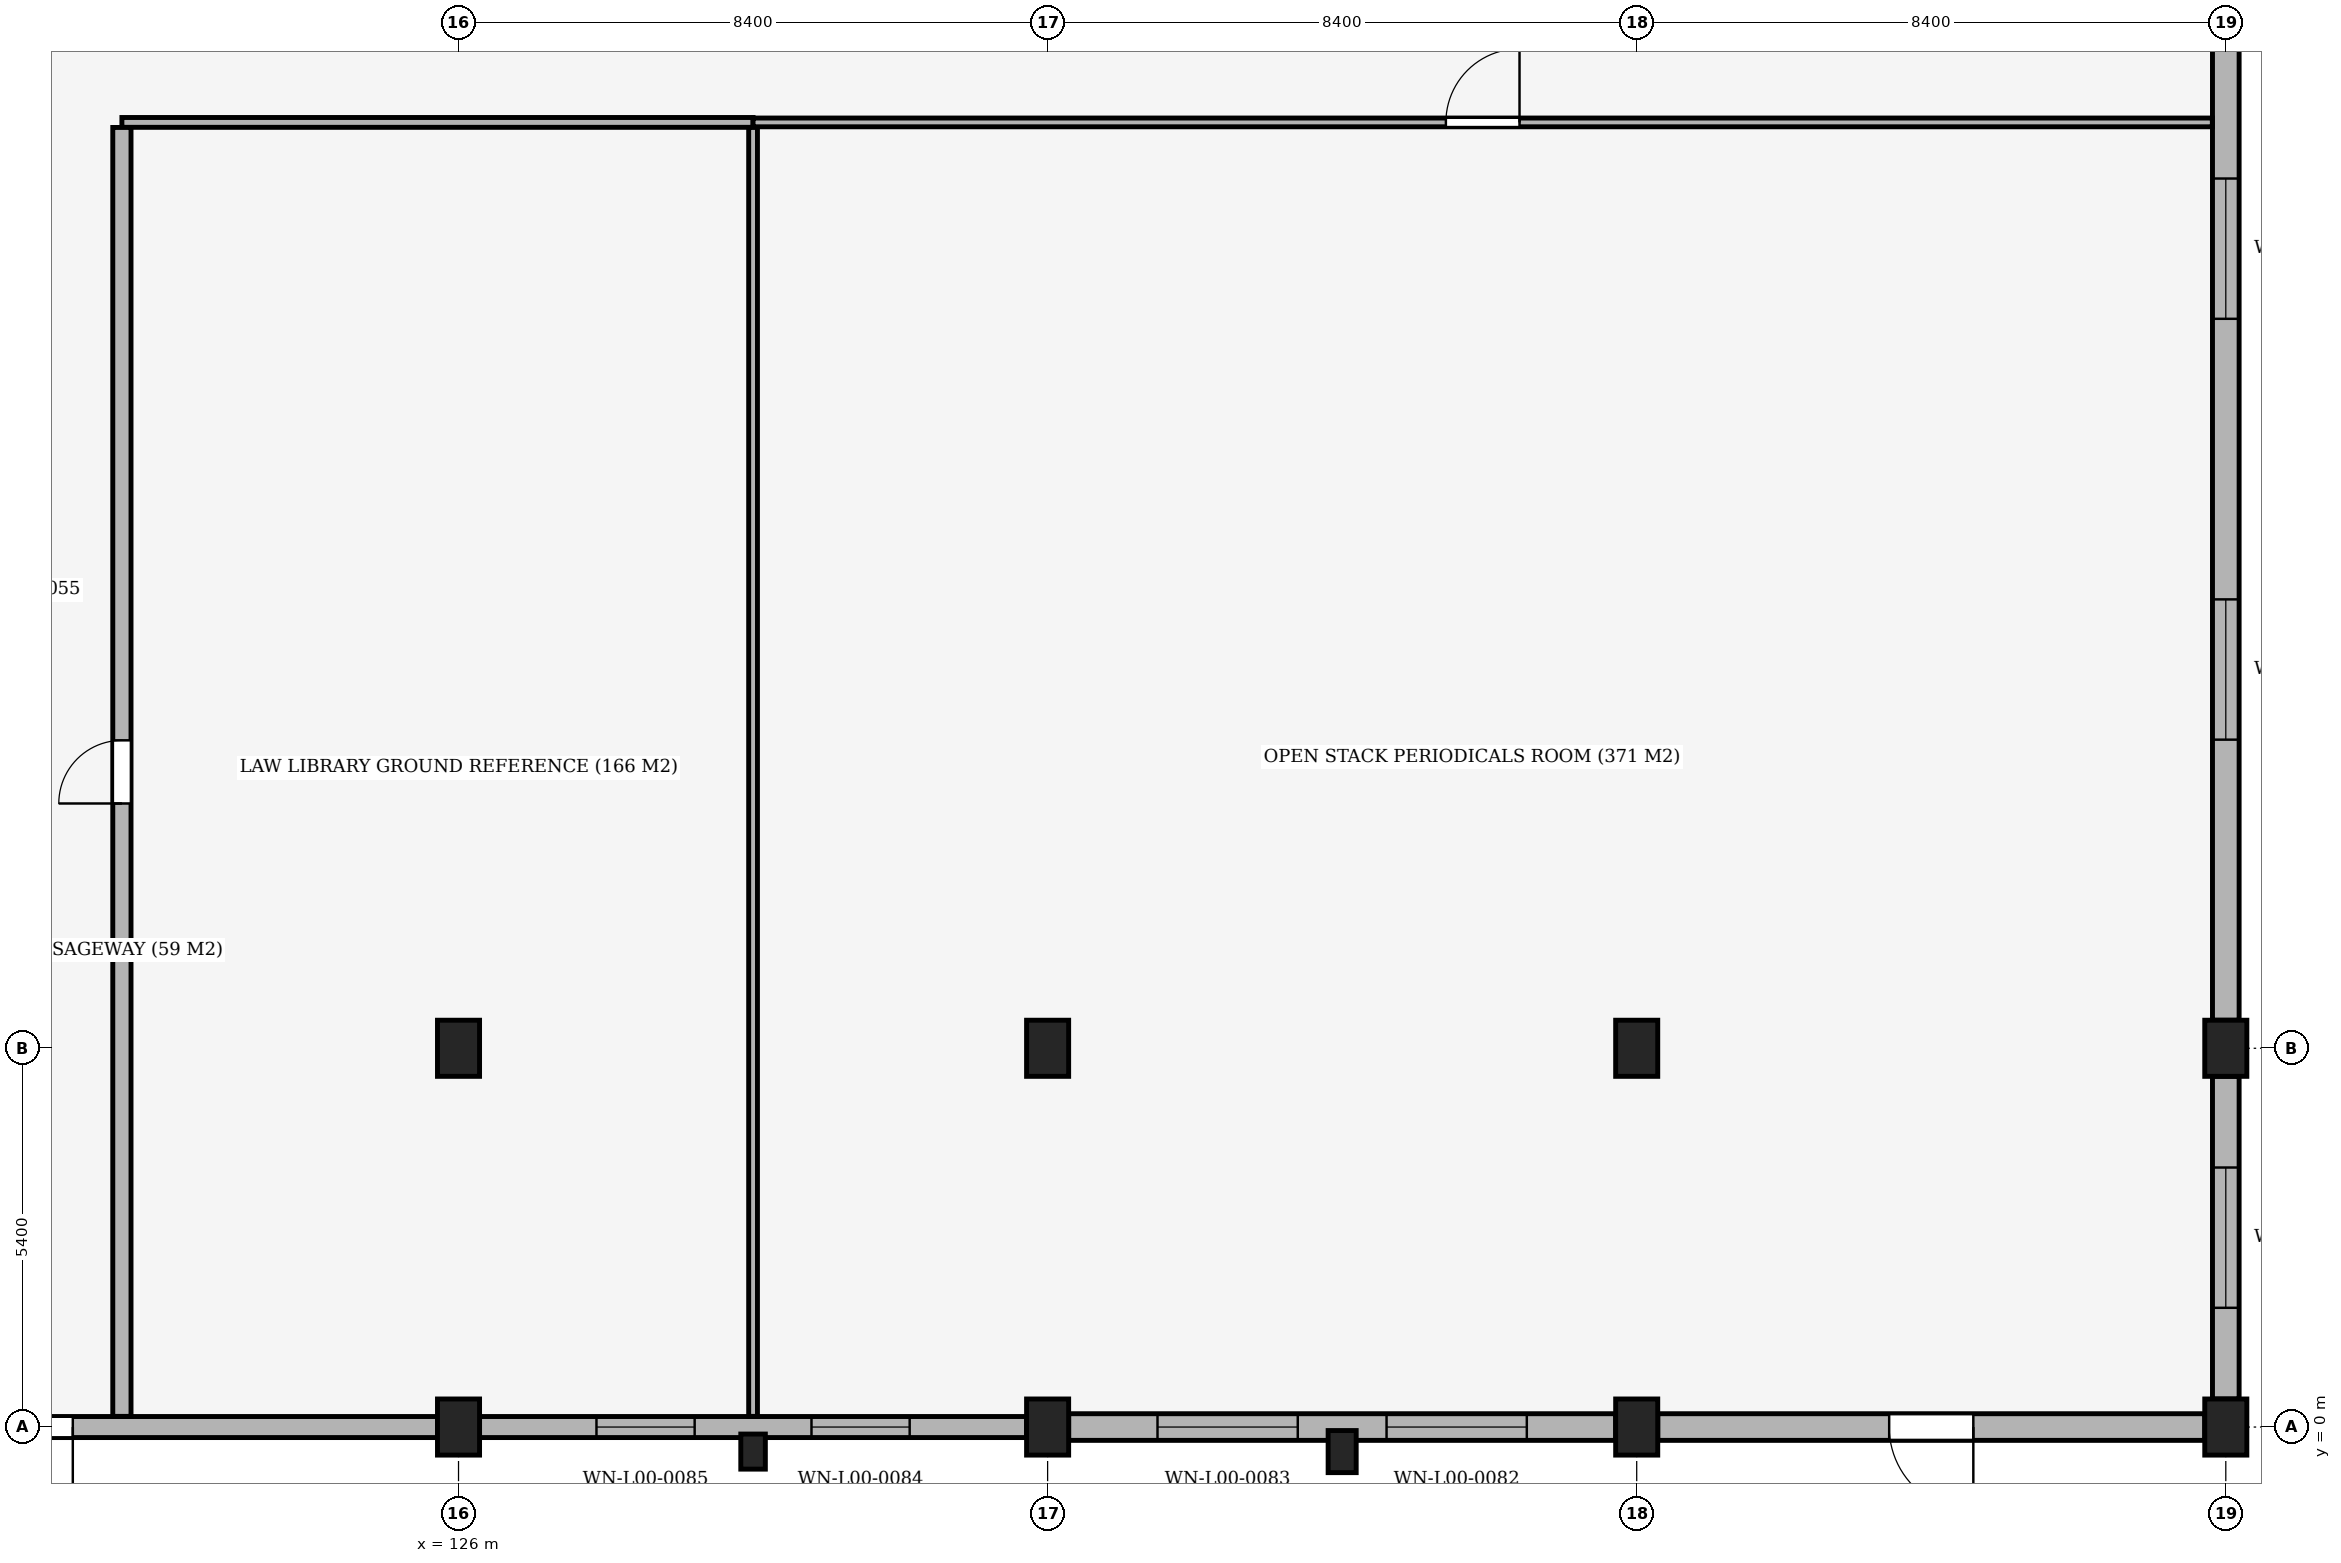
"""IFC4 building model, lengths in metres.
Left out: names, types, materials, properties, quantities, classifications, styles, units other than length and angle.
Written with IfcOpenShell. Run it as: python <this file> out.ifc"""

import sys

from ifc_helpers import new_model, si_unit, direction, frame, frame_2d, origin, origin_2d, place, context, subcontext, project, spatial, rectangle, extrude, element, fill, save


model = new_model("IFC4")
c1 = context("Model", 3, precision=1e-05, world=origin(), true_north=direction((0.0, 1.0)))
c2 = subcontext(c1, "Body", "Model", "MODEL_VIEW")
j1 = project(units=[si_unit("LENGTHUNIT", "METRE"), si_unit("PLANEANGLEUNIT", "RADIAN")], contexts=[c1])
p1 = place(None, origin())
s1 = spatial("IfcSite", under=j1, at=p1, CompositionType="ELEMENT")
p2 = place(p1, origin())
s2 = spatial("IfcBuilding", under=s1, at=p2, CompositionType="ELEMENT")
p3 = place(p2, origin())
s3 = spatial("IfcBuildingStorey", under=s2, at=p3, CompositionType="ELEMENT", Elevation=0.0)
for number, where, z_axis, x_axis in (
    (1, (126.0, 0.0, 0.0), (0.0, 0.0, 1.0), (1.0, 0.0, 0.0)),
    (2, (126.0, 5.4, 0.0), (0.0, 0.0, 1.0), (1.0, 0.0, 0.0)),
    (3, (134.4, 0.0, 0.0), (0.0, 0.0, 1.0), (1.0, 0.0, 0.0)),
    (4, (134.4, 5.4, 0.0), (0.0, 0.0, 1.0), (1.0, 0.0, 0.0)),
    (5, (142.8, 0.0, 0.0), (0.0, 0.0, 1.0), (1.0, 0.0, 0.0)),
    (6, (142.8, 5.4, 0.0), (0.0, 0.0, 1.0), (1.0, 0.0, 0.0)),
    (7, (151.2, 0.0, 0.0), (0.0, 0.0, 1.0), (1.0, 0.0, 0.0)),
    (8, (151.2, 5.4, 0.0), (0.0, 0.0, 1.0), (1.0, 0.0, 0.0)),
):
    element("IfcColumn", number, at=place(p3, frame(where, z_axis=z_axis, x_axis=x_axis)), inside=s3, PredefinedType="COLUMN", context=c2, shape_type="SweptSolid", body=[
        extrude(rectangle(XDim=0.6, YDim=0.8, at=origin_2d()), origin(), (0.0, 0.0, 1.0), 5.1),
    ])
p4 = place(p3, frame((130.2, -0.35, 0.0), z_axis=(0.0, 0.0, 1.0), x_axis=(1.0, 0.0, 0.0)))
e9 = element("IfcColumn", 9, at=p4, inside=s3, PredefinedType="PILASTER", context=c2, shape_type="SweptSolid", body=[
    extrude(rectangle(XDim=0.35, YDim=0.5, at=origin_2d()), origin(), (0.0, 0.0, 1.0), 5.1),
])
p5 = place(p3, frame((138.6, -0.35, 0.0), z_axis=(0.0, 0.0, 1.0), x_axis=(1.0, 0.0, 0.0)))
e10 = element("IfcColumn", 10, at=p5, inside=s3, PredefinedType="PILASTER", context=c2, shape_type="SweptSolid", body=[
    extrude(rectangle(XDim=0.4, YDim=0.6, at=origin_2d()), origin(), (0.0, 0.0, 1.0), 5.1),
])
p6 = place(p3, frame((151.2, 21.8, 0.0), z_axis=(0.0, 0.0, 1.0), x_axis=(0.0, -1.0, 0.0)))
e11 = element("IfcWall", 11, at=p6, inside=s3, PredefinedType="SOLIDWALL", context=c2, shape_type="SweptSolid", body=[
    extrude(rectangle(XDim=16.0, YDim=0.38, at=frame_2d((8.0, 0.0))), origin(), (0.0, 0.0, 1.0), 3.67),
])
p7 = place(p6, frame((4.0, 0.0, 2.1)))
e12 = element("IfcOpeningElement", 12, at=p7, cuts=e11, PredefinedType="OPENING", context=c2, shape_type="SweptSolid", body=[
    extrude(rectangle(XDim=2.0, YDim=1.2, at=frame_2d((1.0, 0.6))), frame((0.0, 0.205, 0.0), z_axis=(0.0, -1.0, 0.0), x_axis=(1.0, 0.0, 0.0)), (0.0, 0.0, 1.0), 0.41),
])
p8 = place(p6, frame((10.0, 0.0, 2.1)))
e13 = element("IfcOpeningElement", 13, at=p8, cuts=e11, PredefinedType="OPENING", context=c2, shape_type="SweptSolid", body=[
    extrude(rectangle(XDim=2.0, YDim=1.2, at=frame_2d((1.0, 0.6))), frame((0.0, 0.205, 0.0), z_axis=(0.0, -1.0, 0.0), x_axis=(1.0, 0.0, 0.0)), (0.0, 0.0, 1.0), 0.41),
])
p9 = place(p3, frame((151.2, 5.0, 0.0), z_axis=(0.0, 0.0, 1.0), x_axis=(0.0, -1.0, 0.0)))
e14 = element("IfcWall", 14, at=p9, inside=s3, PredefinedType="SOLIDWALL", context=c2, shape_type="SweptSolid", body=[
    extrude(rectangle(XDim=4.6, YDim=0.38, at=frame_2d((2.3, 0.0))), origin(), (0.0, 0.0, 1.0), 4.17),
])
p10 = place(p9, frame((1.3, 0.0, 2.1)))
e15 = element("IfcOpeningElement", 15, at=p10, cuts=e14, PredefinedType="OPENING", context=c2, shape_type="SweptSolid", body=[
    extrude(rectangle(XDim=2.0, YDim=1.2, at=frame_2d((1.0, 0.6))), frame((0.0, 0.205, 0.0), z_axis=(0.0, -1.0, 0.0), x_axis=(1.0, 0.0, 0.0)), (0.0, 0.0, 1.0), 0.41),
])
p11 = place(p3, frame((150.9, 0.0, 0.0), z_axis=(0.0, 0.0, 1.0), x_axis=(-1.0, 0.0, 0.0)))
e16 = element("IfcWall", 16, at=p11, inside=s3, PredefinedType="SOLIDWALL", context=c2, shape_type="SweptSolid", body=[
    extrude(rectangle(XDim=7.8, YDim=0.38, at=frame_2d((3.9, 0.0))), origin(), (0.0, 0.0, 1.0), 4.07),
])
p12 = place(p11, frame((3.3, 0.0, 0.0)))
e17 = element("IfcOpeningElement", 17, at=p12, cuts=e16, PredefinedType="OPENING", context=c2, shape_type="SweptSolid", body=[
    extrude(rectangle(XDim=1.2, YDim=2.2, at=frame_2d((0.6, 1.1))), frame((0.0, 0.205, 0.0), z_axis=(0.0, -1.0, 0.0), x_axis=(1.0, 0.0, 0.0)), (0.0, 0.0, 1.0), 0.41),
])
p13 = place(p3, frame((142.5, 0.0, 0.0), z_axis=(0.0, 0.0, 1.0), x_axis=(-1.0, 0.0, 0.0)))
e18 = element("IfcWall", 18, at=p13, inside=s3, PredefinedType="SOLIDWALL", context=c2, shape_type="SweptSolid", body=[
    extrude(rectangle(XDim=7.8, YDim=0.38, at=frame_2d((3.9, 0.0))), origin(), (0.0, 0.0, 1.0), 4.07),
])
p14 = place(p13, frame((1.267, 0.0, 2.1)))
e19 = element("IfcOpeningElement", 19, at=p14, cuts=e18, PredefinedType="OPENING", context=c2, shape_type="SweptSolid", body=[
    extrude(rectangle(XDim=2.0, YDim=1.2, at=frame_2d((1.0, 0.6))), frame((0.0, 0.205, 0.0), z_axis=(0.0, -1.0, 0.0), x_axis=(1.0, 0.0, 0.0)), (0.0, 0.0, 1.0), 0.41),
])
p15 = place(p13, frame((4.533, 0.0, 2.1)))
e20 = element("IfcOpeningElement", 20, at=p15, cuts=e18, PredefinedType="OPENING", context=c2, shape_type="SweptSolid", body=[
    extrude(rectangle(XDim=2.0, YDim=1.2, at=frame_2d((1.0, 0.6))), frame((0.0, 0.205, 0.0), z_axis=(0.0, -1.0, 0.0), x_axis=(1.0, 0.0, 0.0)), (0.0, 0.0, 1.0), 0.41),
])
p16 = place(p3, frame((134.1, 0.0, 0.0), z_axis=(0.0, 0.0, 1.0), x_axis=(-1.0, 0.0, 0.0)))
e21 = element("IfcWall", 21, at=p16, inside=s3, PredefinedType="SOLIDWALL", context=c2, shape_type="SweptSolid", body=[
    extrude(rectangle(XDim=7.8, YDim=0.3, at=frame_2d((3.9, 0.0))), origin(), (0.0, 0.0, 1.0), 4.07),
])
p17 = place(p16, frame((1.667, 0.0, 0.85)))
e22 = element("IfcOpeningElement", 22, at=p17, cuts=e21, PredefinedType="OPENING", context=c2, shape_type="SweptSolid", body=[
    extrude(rectangle(XDim=1.4, YDim=2.4, at=frame_2d((0.7, 1.2))), frame((0.0, 0.165, 0.0), z_axis=(0.0, -1.0, 0.0), x_axis=(1.0, 0.0, 0.0)), (0.0, 0.0, 1.0), 0.33),
])
p18 = place(p16, frame((4.733, 0.0, 0.85)))
e23 = element("IfcOpeningElement", 23, at=p18, cuts=e21, PredefinedType="OPENING", context=c2, shape_type="SweptSolid", body=[
    extrude(rectangle(XDim=1.4, YDim=2.4, at=frame_2d((0.7, 1.2))), frame((0.0, 0.165, 0.0), z_axis=(0.0, -1.0, 0.0), x_axis=(1.0, 0.0, 0.0)), (0.0, 0.0, 1.0), 0.33),
])
p19 = place(p3, frame((125.7, 0.0, 0.0), z_axis=(0.0, 0.0, 1.0), x_axis=(-1.0, 0.0, 0.0)))
e24 = element("IfcWall", 24, at=p19, inside=s3, PredefinedType="SOLIDWALL", context=c2, shape_type="SweptSolid", body=[
    extrude(rectangle(XDim=7.8, YDim=0.3, at=frame_2d((3.9, 0.0))), origin(), (0.0, 0.0, 1.0), 4.07),
])
p20 = place(p19, frame((5.2, 0.0, 0.0)))
e25 = element("IfcOpeningElement", 25, at=p20, cuts=e24, PredefinedType="OPENING", context=c2, shape_type="SweptSolid", body=[
    extrude(rectangle(XDim=1.8, YDim=2.2, at=frame_2d((0.9, 1.1))), frame((0.0, 0.165, 0.0), z_axis=(0.0, -1.0, 0.0), x_axis=(1.0, 0.0, 0.0)), (0.0, 0.0, 1.0), 0.33),
])
p21 = place(p3, frame((121.2, 18.6, 0.0), z_axis=(0.0, 0.0, 1.0), x_axis=(1.0, 0.0, 0.0)))
e26 = element("IfcWall", 26, at=p21, inside=s3, PredefinedType="PARTITIONING", context=c2, shape_type="SweptSolid", body=[
    extrude(rectangle(XDim=9.0, YDim=0.14, at=frame_2d((4.5, 0.0))), origin(), (0.0, 0.0, 1.0), 3.67),
])
p22 = place(p3, frame((130.2, 18.6, 0.0), z_axis=(0.0, 0.0, 1.0), x_axis=(1.0, 0.0, 0.0)))
e27 = element("IfcWall", 27, at=p22, inside=s3, PredefinedType="PARTITIONING", context=c2, shape_type="SweptSolid", body=[
    extrude(rectangle(XDim=20.808, YDim=0.125, at=frame_2d((10.404, 0.0))), origin(), (0.0, 0.0, 1.0), 3.67),
])
p23 = place(p22, frame((9.879, 0.0, 0.0)))
e28 = element("IfcOpeningElement", 28, at=p23, cuts=e27, PredefinedType="OPENING", context=c2, shape_type="SweptSolid", body=[
    extrude(rectangle(XDim=1.05, YDim=2.1, at=frame_2d((0.525, 1.05))), frame((0.0, 0.077, 0.0), z_axis=(0.0, -1.0, 0.0), x_axis=(1.0, 0.0, 0.0)), (0.0, 0.0, 1.0), 0.155),
])
p24 = place(p3, frame((121.2, 0.152, 0.0), z_axis=(0.0, 0.0, 1.0), x_axis=(0.0, 1.0, 0.0)))
e29 = element("IfcWall", 29, at=p24, inside=s3, PredefinedType="PARTITIONING", context=c2, shape_type="SweptSolid", body=[
    extrude(rectangle(XDim=18.376, YDim=0.26, at=frame_2d((9.188, 0.0))), origin(), (0.0, 0.0, 1.0), 4.07),
])
p25 = place(p24, frame((8.738, 0.0, 0.0)))
e30 = element("IfcOpeningElement", 30, at=p25, cuts=e29, PredefinedType="OPENING", context=c2, shape_type="SweptSolid", body=[
    extrude(rectangle(XDim=0.9, YDim=2.1, at=frame_2d((0.45, 1.05))), frame((0.0, 0.145, 0.0), z_axis=(0.0, -1.0, 0.0), x_axis=(1.0, 0.0, 0.0)), (0.0, 0.0, 1.0), 0.29),
])
p26 = place(p3, frame((130.2, 0.152, 0.0), z_axis=(0.0, 0.0, 1.0), x_axis=(0.0, 1.0, 0.0)))
e31 = element("IfcWall", 31, at=p26, inside=s3, PredefinedType="PARTITIONING", context=c2, shape_type="SweptSolid", body=[
    extrude(rectangle(XDim=18.376, YDim=0.125, at=frame_2d((9.188, 0.0))), origin(), (0.0, 0.0, 1.0), 4.07),
])
p27 = place(p7, origin())
e32 = element("IfcWindow", 32, at=p27, inside=s3, PartitioningType="SINGLE_PANEL", PredefinedType="WINDOW", context=c2, shape_type="SweptSolid", body=[
    extrude(rectangle(XDim=2.0, YDim=1.2, at=frame_2d((1.0, 0.6))), frame((0.0, 0.03, 0.0), z_axis=(0.0, -1.0, 0.0), x_axis=(1.0, 0.0, 0.0)), (0.0, 0.0, 1.0), 0.06),
])
fill(e12, e32)
p28 = place(p8, origin())
e33 = element("IfcWindow", 33, at=p28, inside=s3, PartitioningType="SINGLE_PANEL", PredefinedType="WINDOW", context=c2, shape_type="SweptSolid", body=[
    extrude(rectangle(XDim=2.0, YDim=1.2, at=frame_2d((1.0, 0.6))), frame((0.0, 0.03, 0.0), z_axis=(0.0, -1.0, 0.0), x_axis=(1.0, 0.0, 0.0)), (0.0, 0.0, 1.0), 0.06),
])
fill(e13, e33)
p29 = place(p10, origin())
e34 = element("IfcWindow", 34, at=p29, inside=s3, PartitioningType="SINGLE_PANEL", PredefinedType="WINDOW", context=c2, shape_type="SweptSolid", body=[
    extrude(rectangle(XDim=2.0, YDim=1.2, at=frame_2d((1.0, 0.6))), frame((0.0, 0.03, 0.0), z_axis=(0.0, -1.0, 0.0), x_axis=(1.0, 0.0, 0.0)), (0.0, 0.0, 1.0), 0.06),
])
fill(e15, e34)
p30 = place(p12, origin())
e35 = element("IfcDoor", 35, at=p30, inside=s3, OperationType="SINGLE_SWING_LEFT", PredefinedType="DOOR", context=c2, shape_type="SweptSolid", body=[
    extrude(rectangle(XDim=1.2, YDim=2.2, at=frame_2d((0.6, 1.1))), frame((0.0, 0.025, 0.0), z_axis=(0.0, -1.0, 0.0), x_axis=(1.0, 0.0, 0.0)), (0.0, 0.0, 1.0), 0.05),
])
fill(e17, e35)
p31 = place(p14, origin())
e36 = element("IfcWindow", 36, at=p31, inside=s3, PartitioningType="SINGLE_PANEL", PredefinedType="WINDOW", context=c2, shape_type="SweptSolid", body=[
    extrude(rectangle(XDim=2.0, YDim=1.2, at=frame_2d((1.0, 0.6))), frame((0.0, 0.03, 0.0), z_axis=(0.0, -1.0, 0.0), x_axis=(1.0, 0.0, 0.0)), (0.0, 0.0, 1.0), 0.06),
])
fill(e19, e36)
p32 = place(p15, origin())
e37 = element("IfcWindow", 37, at=p32, inside=s3, PartitioningType="SINGLE_PANEL", PredefinedType="WINDOW", context=c2, shape_type="SweptSolid", body=[
    extrude(rectangle(XDim=2.0, YDim=1.2, at=frame_2d((1.0, 0.6))), frame((0.0, 0.03, 0.0), z_axis=(0.0, -1.0, 0.0), x_axis=(1.0, 0.0, 0.0)), (0.0, 0.0, 1.0), 0.06),
])
fill(e20, e37)
p33 = place(p17, origin())
e38 = element("IfcWindow", 38, at=p33, inside=s3, PartitioningType="SINGLE_PANEL", PredefinedType="WINDOW", context=c2, shape_type="SweptSolid", body=[
    extrude(rectangle(XDim=1.4, YDim=2.4, at=frame_2d((0.7, 1.2))), frame((0.0, 0.03, 0.0), z_axis=(0.0, -1.0, 0.0), x_axis=(1.0, 0.0, 0.0)), (0.0, 0.0, 1.0), 0.06),
])
fill(e22, e38)
p34 = place(p18, origin())
e39 = element("IfcWindow", 39, at=p34, inside=s3, PartitioningType="SINGLE_PANEL", PredefinedType="WINDOW", context=c2, shape_type="SweptSolid", body=[
    extrude(rectangle(XDim=1.4, YDim=2.4, at=frame_2d((0.7, 1.2))), frame((0.0, 0.03, 0.0), z_axis=(0.0, -1.0, 0.0), x_axis=(1.0, 0.0, 0.0)), (0.0, 0.0, 1.0), 0.06),
])
fill(e23, e39)
p35 = place(p20, origin())
e40 = element("IfcDoor", 40, at=p35, inside=s3, OperationType="DOUBLE_DOOR_SINGLE_SWING", PredefinedType="DOOR", context=c2, shape_type="SweptSolid", body=[
    extrude(rectangle(XDim=1.8, YDim=2.2, at=frame_2d((0.9, 1.1))), frame((0.0, 0.025, 0.0), z_axis=(0.0, -1.0, 0.0), x_axis=(1.0, 0.0, 0.0)), (0.0, 0.0, 1.0), 0.05),
])
fill(e25, e40)
p36 = place(p25, origin())
e41 = element("IfcDoor", 41, at=p36, inside=s3, OperationType="SINGLE_SWING_LEFT", PredefinedType="DOOR", context=c2, shape_type="SweptSolid", body=[
    extrude(rectangle(XDim=0.9, YDim=2.1, at=frame_2d((0.45, 1.05))), frame((0.0, 0.025, 0.0), z_axis=(0.0, -1.0, 0.0), x_axis=(1.0, 0.0, 0.0)), (0.0, 0.0, 1.0), 0.05),
])
fill(e30, e41)
p37 = place(p23, origin())
e42 = element("IfcDoor", 42, at=p37, inside=s3, OperationType="SINGLE_SWING_RIGHT", PredefinedType="DOOR", context=c2, shape_type="SweptSolid", body=[
    extrude(rectangle(XDim=1.05, YDim=2.1, at=frame_2d((0.525, 1.05))), frame((0.0, 0.025, 0.0), z_axis=(0.0, -1.0, 0.0), x_axis=(1.0, 0.0, 0.0)), (0.0, 0.0, 1.0), 0.05),
])
fill(e28, e42)
save(model, sys.argv[1])
